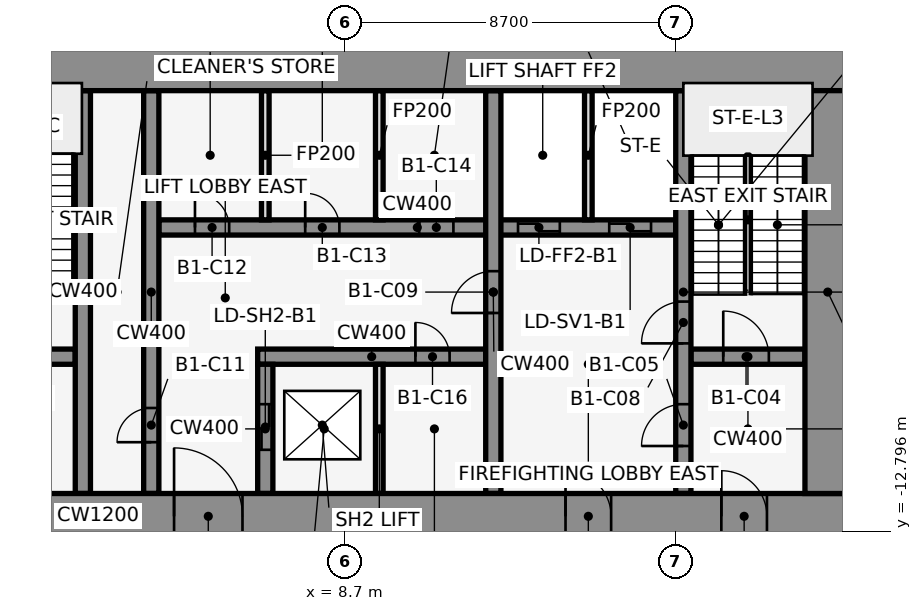
"""IFC4 building model, lengths in metres.
Left out: names, types, materials, properties, quantities, classifications, styles, units other than length and angle.
Written with IfcOpenShell. Run it as: python <this file> out.ifc"""

import sys

from ifc_helpers import new_model, si_unit, direction, frame, frame_2d, origin, place, context, subcontext, project, spatial, rectangle, extrude, element, fill, save


model = new_model("IFC4")
c1 = context("Model", 3, precision=1e-05, world=origin(), true_north=direction((0.0, 1.0)))
c2 = subcontext(c1, "Body", "Model", "MODEL_VIEW")
j1 = project(units=[si_unit("LENGTHUNIT", "METRE"), si_unit("PLANEANGLEUNIT", "RADIAN")], contexts=[c1])
p1 = place(None, origin())
s1 = spatial("IfcSite", under=j1, at=p1, CompositionType="ELEMENT")
p2 = place(p1, origin())
s2 = spatial("IfcBuilding", under=s1, at=p2, CompositionType="ELEMENT")
p3 = place(p2, frame((0.0, 0.0, -5.0)))
s3 = spatial("IfcBuildingStorey", under=s2, at=p3, CompositionType="ELEMENT", Elevation=-5.0)
p4 = place(p3, frame((-1.6, -8.2, 0.0), z_axis=(0.0, 0.0, 1.0), x_axis=(1.0, 0.0, 0.0)))
e1 = element("IfcWall", 1, at=p4, inside=s3, PredefinedType="SHEAR", context=c2, shape_type="SweptSolid", body=[
    extrude(rectangle(XDim=3.2, YDim=0.4, at=frame_2d((1.6, 0.0))), origin(), (0.0, 0.0, 1.0), 5.0),
])
p5 = place(p4, frame((1.05, 0.0, 0.0)))
e2 = element("IfcOpeningElement", 2, at=p5, cuts=e1, PredefinedType="OPENING", context=c2, shape_type="SweptSolid", body=[
    extrude(rectangle(XDim=1.2, YDim=2.1, at=frame_2d((0.6, 1.05))), frame((0.0, 0.212, 0.0), z_axis=(0.0, -1.0, 0.0), x_axis=(1.0, 0.0, 0.0)), (0.0, 0.0, 1.0), 0.424),
])
p6 = place(p3, frame((6.4, -8.2, 0.0), z_axis=(0.0, 0.0, 1.0), x_axis=(1.0, 0.0, 0.0)))
e3 = element("IfcWall", 3, at=p6, inside=s3, PredefinedType="SHEAR", context=c2, shape_type="SweptSolid", body=[
    extrude(rectangle(XDim=6.0, YDim=0.4, at=frame_2d((3.0, 0.0))), origin(), (0.0, 0.0, 1.0), 5.0),
])
p7 = place(p6, frame((4.15, 0.0, 0.0)))
e4 = element("IfcOpeningElement", 4, at=p7, cuts=e3, PredefinedType="OPENING", context=c2, shape_type="SweptSolid", body=[
    extrude(rectangle(XDim=0.9, YDim=2.1, at=frame_2d((0.45, 1.05))), frame((0.0, 0.212, 0.0), z_axis=(0.0, -1.0, 0.0), x_axis=(1.0, 0.0, 0.0)), (0.0, 0.0, 1.0), 0.424),
])
p8 = place(p3, frame((17.8, -8.2, 0.0), z_axis=(0.0, 0.0, 1.0), x_axis=(1.0, 0.0, 0.0)))
e5 = element("IfcWall", 5, at=p8, inside=s3, PredefinedType="SHEAR", context=c2, shape_type="SweptSolid", body=[
    extrude(rectangle(XDim=3.0, YDim=0.4, at=frame_2d((1.5, 0.0))), origin(), (0.0, 0.0, 1.0), 5.0),
])
p9 = place(p8, frame((0.85, 0.0, 0.0)))
e6 = element("IfcOpeningElement", 6, at=p9, cuts=e5, PredefinedType="OPENING", context=c2, shape_type="SweptSolid", body=[
    extrude(rectangle(XDim=1.2, YDim=2.1, at=frame_2d((0.6, 1.05))), frame((0.0, 0.212, 0.0), z_axis=(0.0, -1.0, 0.0), x_axis=(1.0, 0.0, 0.0)), (0.0, 0.0, 1.0), 0.424),
])
p10 = place(p3, frame((3.8, -4.8, 0.0), z_axis=(0.0, 0.0, 1.0), x_axis=(1.0, 0.0, 0.0)))
e7 = element("IfcWall", 7, at=p10, inside=s3, PredefinedType="SHEAR", context=c2, shape_type="SweptSolid", body=[
    extrude(rectangle(XDim=13.6, YDim=0.4, at=frame_2d((6.8, 0.0))), origin(), (0.0, 0.0, 1.0), 5.0),
])
p11 = place(p10, frame((9.45, 0.0, 0.0)))
e8 = element("IfcOpeningElement", 8, at=p11, cuts=e7, PredefinedType="OPENING", context=c2, shape_type="SweptSolid", body=[
    extrude(rectangle(XDim=1.1, YDim=2.1, at=frame_2d((0.55, 1.05))), frame((0.0, 0.212, 0.0), z_axis=(0.0, -1.0, 0.0), x_axis=(1.0, 0.0, 0.0)), (0.0, 0.0, 1.0), 0.424),
])
p12 = place(p10, frame((11.85, 0.0, 0.0)))
e9 = element("IfcOpeningElement", 9, at=p12, cuts=e7, PredefinedType="OPENING", context=c2, shape_type="SweptSolid", body=[
    extrude(rectangle(XDim=1.1, YDim=2.1, at=frame_2d((0.55, 1.05))), frame((0.0, 0.212, 0.0), z_axis=(0.0, -1.0, 0.0), x_axis=(1.0, 0.0, 0.0)), (0.0, 0.0, 1.0), 0.424),
])
p13 = place(p10, frame((0.95, 0.0, 0.0)))
e10 = element("IfcOpeningElement", 10, at=p13, cuts=e7, PredefinedType="OPENING", context=c2, shape_type="SweptSolid", body=[
    extrude(rectangle(XDim=0.9, YDim=2.1, at=frame_2d((0.45, 1.05))), frame((0.0, 0.212, 0.0), z_axis=(0.0, -1.0, 0.0), x_axis=(1.0, 0.0, 0.0)), (0.0, 0.0, 1.0), 0.424),
])
p14 = place(p10, frame((3.85, 0.0, 0.0)))
e11 = element("IfcOpeningElement", 11, at=p14, cuts=e7, PredefinedType="OPENING", context=c2, shape_type="SweptSolid", body=[
    extrude(rectangle(XDim=0.9, YDim=2.1, at=frame_2d((0.45, 1.05))), frame((0.0, 0.212, 0.0), z_axis=(0.0, -1.0, 0.0), x_axis=(1.0, 0.0, 0.0)), (0.0, 0.0, 1.0), 0.424),
])
p15 = place(p10, frame((6.85, 0.0, 0.0)))
e12 = element("IfcOpeningElement", 12, at=p15, cuts=e7, PredefinedType="OPENING", context=c2, shape_type="SweptSolid", body=[
    extrude(rectangle(XDim=0.9, YDim=2.1, at=frame_2d((0.45, 1.05))), frame((0.0, 0.212, 0.0), z_axis=(0.0, -1.0, 0.0), x_axis=(1.0, 0.0, 0.0)), (0.0, 0.0, 1.0), 0.424),
])
p16 = place(p3, frame((1.8, -11.8, 0.0), z_axis=(0.0, 0.0, 1.0), x_axis=(0.0, 1.0, 0.0)))
e13 = element("IfcWall", 13, at=p16, inside=s3, PredefinedType="SHEAR", context=c2, shape_type="SweptSolid", body=[
    extrude(rectangle(XDim=10.6, YDim=0.4, at=frame_2d((5.3, 0.0))), origin(), (0.0, 0.0, 1.0), 5.0),
])
p17 = place(p3, frame((3.6, -11.8, 0.0), z_axis=(0.0, 0.0, 1.0), x_axis=(0.0, 1.0, 0.0)))
e14 = element("IfcWall", 14, at=p17, inside=s3, PredefinedType="SHEAR", context=c2, shape_type="SweptSolid", body=[
    extrude(rectangle(XDim=10.6, YDim=0.4, at=frame_2d((5.3, 0.0))), origin(), (0.0, 0.0, 1.0), 5.0),
])
p18 = place(p17, frame((1.35, 0.0, 0.0)))
e15 = element("IfcOpeningElement", 15, at=p18, cuts=e14, PredefinedType="OPENING", context=c2, shape_type="SweptSolid", body=[
    extrude(rectangle(XDim=0.9, YDim=2.1, at=frame_2d((0.45, 1.05))), frame((0.0, 0.212, 0.0), z_axis=(0.0, -1.0, 0.0), x_axis=(1.0, 0.0, 0.0)), (0.0, 0.0, 1.0), 0.424),
])
p19 = place(p3, frame((6.6, -11.8, 0.0), z_axis=(0.0, 0.0, 1.0), x_axis=(0.0, 1.0, 0.0)))
e16 = element("IfcWall", 16, at=p19, inside=s3, PredefinedType="SHEAR", context=c2, shape_type="SweptSolid", body=[
    extrude(rectangle(XDim=3.4, YDim=0.4, at=frame_2d((1.7, 0.0))), origin(), (0.0, 0.0, 1.0), 5.0),
])
p20 = place(p19, frame((1.15, 0.0, 0.0)))
e17 = element("IfcOpeningElement", 17, at=p20, cuts=e16, PredefinedType="OPENING", context=c2, shape_type="SweptSolid", body=[
    extrude(rectangle(XDim=1.2, YDim=2.1, at=frame_2d((0.6, 1.05))), frame((0.0, 0.212, 0.0), z_axis=(0.0, -1.0, 0.0), x_axis=(1.0, 0.0, 0.0)), (0.0, 0.0, 1.0), 0.424),
])
for number, where, z_axis, x_axis in (
    (18, (6.6, -4.6, 0.0), (0.0, 0.0, 1.0), (0.0, 1.0, 0.0)),
    (19, (9.6, -11.8, 0.0), (0.0, 0.0, 1.0), (0.0, 1.0, 0.0)),
    (20, (9.6, -4.6, 0.0), (0.0, 0.0, 1.0), (0.0, 1.0, 0.0)),
):
    element("IfcWall", number, at=place(p3, frame(where, z_axis=z_axis, x_axis=x_axis)), inside=s3, PredefinedType="PARTITIONING", context=c2, shape_type="SweptSolid", body=[
        extrude(rectangle(XDim=3.4, YDim=0.2, at=frame_2d((1.7, 0.0))), origin(), (0.0, 0.0, 1.0), 4.7),
    ])
p21 = place(p3, frame((12.6, -11.8, 0.0), z_axis=(0.0, 0.0, 1.0), x_axis=(0.0, 1.0, 0.0)))
e21 = element("IfcWall", 21, at=p21, inside=s3, PredefinedType="SHEAR", context=c2, shape_type="SweptSolid", body=[
    extrude(rectangle(XDim=10.6, YDim=0.4, at=frame_2d((5.3, 0.0))), origin(), (0.0, 0.0, 1.0), 5.0),
])
p22 = place(p21, frame((4.75, 0.0, 0.0)))
e22 = element("IfcOpeningElement", 22, at=p22, cuts=e21, PredefinedType="OPENING", context=c2, shape_type="SweptSolid", body=[
    extrude(rectangle(XDim=1.1, YDim=2.1, at=frame_2d((0.55, 1.05))), frame((0.0, 0.212, 0.0), z_axis=(0.0, -1.0, 0.0), x_axis=(1.0, 0.0, 0.0)), (0.0, 0.0, 1.0), 0.424),
])
p23 = place(p3, frame((15.1, -4.6, 0.0), z_axis=(0.0, 0.0, 1.0), x_axis=(0.0, 1.0, 0.0)))
e23 = element("IfcWall", 23, at=p23, inside=s3, PredefinedType="PARTITIONING", context=c2, shape_type="SweptSolid", body=[
    extrude(rectangle(XDim=3.4, YDim=0.2, at=frame_2d((1.7, 0.0))), origin(), (0.0, 0.0, 1.0), 4.7),
])
p24 = place(p3, frame((17.6, -11.8, 0.0), z_axis=(0.0, 0.0, 1.0), x_axis=(0.0, 1.0, 0.0)))
e24 = element("IfcWall", 24, at=p24, inside=s3, PredefinedType="SHEAR", context=c2, shape_type="SweptSolid", body=[
    extrude(rectangle(XDim=10.6, YDim=0.4, at=frame_2d((5.3, 0.0))), origin(), (0.0, 0.0, 1.0), 5.0),
])
p25 = place(p24, frame((1.25, 0.0, 0.0)))
e25 = element("IfcOpeningElement", 25, at=p25, cuts=e24, PredefinedType="OPENING", context=c2, shape_type="SweptSolid", body=[
    extrude(rectangle(XDim=1.1, YDim=2.1, at=frame_2d((0.55, 1.05))), frame((0.0, 0.212, 0.0), z_axis=(0.0, -1.0, 0.0), x_axis=(1.0, 0.0, 0.0)), (0.0, 0.0, 1.0), 0.424),
])
p26 = place(p24, frame((3.95, 0.0, 0.0)))
e26 = element("IfcOpeningElement", 26, at=p26, cuts=e24, PredefinedType="OPENING", context=c2, shape_type="SweptSolid", body=[
    extrude(rectangle(XDim=1.1, YDim=2.1, at=frame_2d((0.55, 1.05))), frame((0.0, 0.212, 0.0), z_axis=(0.0, -1.0, 0.0), x_axis=(1.0, 0.0, 0.0)), (0.0, 0.0, 1.0), 0.424),
])
p27 = place(p3, frame((-22.0, -0.6, 0.0), z_axis=(0.0, 0.0, 1.0), x_axis=(1.0, 0.0, 0.0)))
e27 = element("IfcWall", 27, at=p27, inside=s3, PredefinedType="SHEAR", context=c2, shape_type="SweptSolid", body=[
    extrude(rectangle(XDim=44.0, YDim=1.2, at=frame_2d((22.0, 0.0))), origin(), (0.0, 0.0, 1.0), 5.0),
])
p28 = place(p3, frame((-22.0, -12.4, 0.0), z_axis=(0.0, 0.0, 1.0), x_axis=(1.0, 0.0, 0.0)))
e28 = element("IfcWall", 28, at=p28, inside=s3, PredefinedType="SHEAR", context=c2, shape_type="SweptSolid", body=[
    extrude(rectangle(XDim=44.0, YDim=1.2, at=frame_2d((22.0, 0.0))), origin(), (0.0, 0.0, 1.0), 5.0),
])
p29 = place(p28, frame((2.2, 0.0, 0.0)))
e29 = element("IfcOpeningElement", 29, at=p29, cuts=e28, PredefinedType="OPENING", context=c2, shape_type="SweptSolid", body=[
    extrude(rectangle(XDim=1.2, YDim=2.1, at=frame_2d((0.6, 1.05))), frame((0.0, 0.612, 0.0), z_axis=(0.0, -1.0, 0.0), x_axis=(1.0, 0.0, 0.0)), (0.0, 0.0, 1.0), 1.224),
])
p30 = place(p28, frame((21.4, 0.0, 0.0)))
e30 = element("IfcOpeningElement", 30, at=p30, cuts=e28, PredefinedType="OPENING", context=c2, shape_type="SweptSolid", body=[
    extrude(rectangle(XDim=1.2, YDim=2.1, at=frame_2d((0.6, 1.05))), frame((0.0, 0.612, 0.0), z_axis=(0.0, -1.0, 0.0), x_axis=(1.0, 0.0, 0.0)), (0.0, 0.0, 1.0), 1.224),
])
p31 = place(p28, frame((40.6, 0.0, 0.0)))
e31 = element("IfcOpeningElement", 31, at=p31, cuts=e28, PredefinedType="OPENING", context=c2, shape_type="SweptSolid", body=[
    extrude(rectangle(XDim=1.2, YDim=2.1, at=frame_2d((0.6, 1.05))), frame((0.0, 0.612, 0.0), z_axis=(0.0, -1.0, 0.0), x_axis=(1.0, 0.0, 0.0)), (0.0, 0.0, 1.0), 1.224),
])
p32 = place(p28, frame((16.0, 0.0, 0.0)))
e32 = element("IfcOpeningElement", 32, at=p32, cuts=e28, PredefinedType="OPENING", context=c2, shape_type="SweptSolid", body=[
    extrude(rectangle(XDim=1.8, YDim=2.1, at=frame_2d((0.9, 1.05))), frame((0.0, 0.612, 0.0), z_axis=(0.0, -1.0, 0.0), x_axis=(1.0, 0.0, 0.0)), (0.0, 0.0, 1.0), 1.224),
])
p33 = place(p28, frame((6.3, 0.0, 0.0)))
e33 = element("IfcOpeningElement", 33, at=p33, cuts=e28, PredefinedType="OPENING", context=c2, shape_type="SweptSolid", body=[
    extrude(rectangle(XDim=1.2, YDim=2.1, at=frame_2d((0.6, 1.05))), frame((0.0, 0.612, 0.0), z_axis=(0.0, -1.0, 0.0), x_axis=(1.0, 0.0, 0.0)), (0.0, 0.0, 1.0), 1.224),
])
p34 = place(p28, frame((26.2, 0.0, 0.0)))
e34 = element("IfcOpeningElement", 34, at=p34, cuts=e28, PredefinedType="OPENING", context=c2, shape_type="SweptSolid", body=[
    extrude(rectangle(XDim=1.8, YDim=2.1, at=frame_2d((0.9, 1.05))), frame((0.0, 0.612, 0.0), z_axis=(0.0, -1.0, 0.0), x_axis=(1.0, 0.0, 0.0)), (0.0, 0.0, 1.0), 1.224),
])
p35 = place(p28, frame((36.5, 0.0, 0.0)))
e35 = element("IfcOpeningElement", 35, at=p35, cuts=e28, PredefinedType="OPENING", context=c2, shape_type="SweptSolid", body=[
    extrude(rectangle(XDim=1.2, YDim=2.1, at=frame_2d((0.6, 1.05))), frame((0.0, 0.612, 0.0), z_axis=(0.0, -1.0, 0.0), x_axis=(1.0, 0.0, 0.0)), (0.0, 0.0, 1.0), 1.224),
])
p36 = place(p3, frame((21.4, -11.8, 0.0), z_axis=(0.0, 0.0, 1.0), x_axis=(0.0, 1.0, 0.0)))
e36 = element("IfcWall", 36, at=p36, inside=s3, PredefinedType="SHEAR", context=c2, shape_type="SweptSolid", body=[
    extrude(rectangle(XDim=10.6, YDim=1.2, at=frame_2d((5.3, 0.0))), origin(), (0.0, 0.0, 1.0), 5.0),
])
p37 = place(p9, origin())
e37 = element("IfcDoor", 37, at=p37, inside=s3, OperationType="SINGLE_SWING_RIGHT", PredefinedType="DOOR", context=c2, shape_type="SweptSolid", body=[
    extrude(rectangle(XDim=1.2, YDim=2.1, at=frame_2d((0.6, 1.05))), frame((0.0, 0.025, 0.0), z_axis=(0.0, -1.0, 0.0), x_axis=(1.0, 0.0, 0.0)), (0.0, 0.0, 1.0), 0.05),
])
fill(e6, e37)
p38 = place(p25, origin())
e38 = element("IfcDoor", 38, at=p38, inside=s3, OperationType="SINGLE_SWING_LEFT", PredefinedType="DOOR", context=c2, shape_type="SweptSolid", body=[
    extrude(rectangle(XDim=1.1, YDim=2.1, at=frame_2d((0.55, 1.05))), frame((0.0, 0.025, 0.0), z_axis=(0.0, -1.0, 0.0), x_axis=(1.0, 0.0, 0.0)), (0.0, 0.0, 1.0), 0.05),
])
fill(e25, e38)
p39 = place(p20, origin())
e39 = element("IfcDoor", 39, at=p39, inside=s3, OperationType="DOUBLE_DOOR_SLIDING", PredefinedType="DOOR", context=c2, shape_type="SweptSolid", body=[
    extrude(rectangle(XDim=1.2, YDim=2.1, at=frame_2d((0.6, 1.05))), frame((0.0, 0.025, 0.0), z_axis=(0.0, -1.0, 0.0), x_axis=(1.0, 0.0, 0.0)), (0.0, 0.0, 1.0), 0.05),
])
fill(e17, e39)
p40 = place(p11, origin())
e40 = element("IfcDoor", 40, at=p40, inside=s3, OperationType="DOUBLE_DOOR_SLIDING", PredefinedType="DOOR", context=c2, shape_type="SweptSolid", body=[
    extrude(rectangle(XDim=1.1, YDim=2.1, at=frame_2d((0.55, 1.05))), frame((0.0, 0.025, 0.0), z_axis=(0.0, -1.0, 0.0), x_axis=(1.0, 0.0, 0.0)), (0.0, 0.0, 1.0), 0.05),
])
fill(e8, e40)
p41 = place(p12, origin())
e41 = element("IfcDoor", 41, at=p41, inside=s3, OperationType="DOUBLE_DOOR_SLIDING", PredefinedType="DOOR", context=c2, shape_type="SweptSolid", body=[
    extrude(rectangle(XDim=1.1, YDim=2.1, at=frame_2d((0.55, 1.05))), frame((0.0, 0.025, 0.0), z_axis=(0.0, -1.0, 0.0), x_axis=(1.0, 0.0, 0.0)), (0.0, 0.0, 1.0), 0.05),
])
fill(e9, e41)
p42 = place(p26, origin())
e42 = element("IfcDoor", 42, at=p42, inside=s3, OperationType="SINGLE_SWING_RIGHT", PredefinedType="DOOR", context=c2, shape_type="SweptSolid", body=[
    extrude(rectangle(XDim=1.1, YDim=2.1, at=frame_2d((0.55, 1.05))), frame((0.0, 0.025, 0.0), z_axis=(0.0, -1.0, 0.0), x_axis=(1.0, 0.0, 0.0)), (0.0, 0.0, 1.0), 0.05),
])
fill(e26, e42)
p43 = place(p22, frame((1.1, 0.0, 0.0), z_axis=(0.0, 0.0, 1.0), x_axis=(-1.0, 0.0, 0.0)))
e43 = element("IfcDoor", 43, at=p43, inside=s3, OperationType="SINGLE_SWING_RIGHT", PredefinedType="DOOR", context=c2, shape_type="SweptSolid", body=[
    extrude(rectangle(XDim=1.1, YDim=2.1, at=frame_2d((0.55, 1.05))), frame((0.0, 0.025, 0.0), z_axis=(0.0, -1.0, 0.0), x_axis=(1.0, 0.0, 0.0)), (0.0, 0.0, 1.0), 0.05),
])
fill(e22, e43)
p44 = place(p18, origin())
e44 = element("IfcDoor", 44, at=p44, inside=s3, OperationType="SINGLE_SWING_LEFT", PredefinedType="DOOR", context=c2, shape_type="SweptSolid", body=[
    extrude(rectangle(XDim=0.9, YDim=2.1, at=frame_2d((0.45, 1.05))), frame((0.0, 0.025, 0.0), z_axis=(0.0, -1.0, 0.0), x_axis=(1.0, 0.0, 0.0)), (0.0, 0.0, 1.0), 0.05),
])
fill(e15, e44)
p45 = place(p13, origin())
e45 = element("IfcDoor", 45, at=p45, inside=s3, OperationType="SINGLE_SWING_RIGHT", PredefinedType="DOOR", context=c2, shape_type="SweptSolid", body=[
    extrude(rectangle(XDim=0.9, YDim=2.1, at=frame_2d((0.45, 1.05))), frame((0.0, 0.025, 0.0), z_axis=(0.0, -1.0, 0.0), x_axis=(1.0, 0.0, 0.0)), (0.0, 0.0, 1.0), 0.05),
])
fill(e10, e45)
p46 = place(p14, origin())
e46 = element("IfcDoor", 46, at=p46, inside=s3, OperationType="SINGLE_SWING_LEFT", PredefinedType="DOOR", context=c2, shape_type="SweptSolid", body=[
    extrude(rectangle(XDim=0.9, YDim=2.1, at=frame_2d((0.45, 1.05))), frame((0.0, 0.025, 0.0), z_axis=(0.0, -1.0, 0.0), x_axis=(1.0, 0.0, 0.0)), (0.0, 0.0, 1.0), 0.05),
])
fill(e11, e46)
p47 = place(p15, origin())
e47 = element("IfcDoor", 47, at=p47, inside=s3, OperationType="SINGLE_SWING_RIGHT", PredefinedType="DOOR", context=c2, shape_type="SweptSolid", body=[
    extrude(rectangle(XDim=0.9, YDim=2.1, at=frame_2d((0.45, 1.05))), frame((0.0, 0.025, 0.0), z_axis=(0.0, -1.0, 0.0), x_axis=(1.0, 0.0, 0.0)), (0.0, 0.0, 1.0), 0.05),
])
fill(e12, e47)
p48 = place(p7, frame((0.9, 0.0, 0.0), z_axis=(0.0, 0.0, 1.0), x_axis=(-1.0, 0.0, 0.0)))
e48 = element("IfcDoor", 48, at=p48, inside=s3, OperationType="SINGLE_SWING_LEFT", PredefinedType="DOOR", context=c2, shape_type="SweptSolid", body=[
    extrude(rectangle(XDim=0.9, YDim=2.1, at=frame_2d((0.45, 1.05))), frame((0.0, 0.025, 0.0), z_axis=(0.0, -1.0, 0.0), x_axis=(1.0, 0.0, 0.0)), (0.0, 0.0, 1.0), 0.05),
])
fill(e4, e48)
p49 = place(p31, frame((1.2, 0.0, 0.0), z_axis=(0.0, 0.0, 1.0), x_axis=(-1.0, 0.0, 0.0)))
e49 = element("IfcDoor", 49, at=p49, inside=s3, OperationType="SINGLE_SWING_RIGHT", PredefinedType="DOOR", context=c2, shape_type="SweptSolid", body=[
    extrude(rectangle(XDim=1.2, YDim=2.1, at=frame_2d((0.6, 1.05))), frame((0.0, 0.025, 0.0), z_axis=(0.0, -1.0, 0.0), x_axis=(1.0, 0.0, 0.0)), (0.0, 0.0, 1.0), 0.05),
])
fill(e31, e49)
p50 = place(p34, origin())
e50 = element("IfcDoor", 50, at=p50, inside=s3, OperationType="SINGLE_SWING_LEFT", PredefinedType="DOOR", context=c2, shape_type="SweptSolid", body=[
    extrude(rectangle(XDim=1.8, YDim=2.1, at=frame_2d((0.9, 1.05))), frame((0.0, 0.025, 0.0), z_axis=(0.0, -1.0, 0.0), x_axis=(1.0, 0.0, 0.0)), (0.0, 0.0, 1.0), 0.05),
])
fill(e34, e50)
p51 = place(p35, frame((1.2, 0.0, 0.0), z_axis=(0.0, 0.0, 1.0), x_axis=(-1.0, 0.0, 0.0)))
e51 = element("IfcDoor", 51, at=p51, inside=s3, OperationType="SINGLE_SWING_RIGHT", PredefinedType="DOOR", context=c2, shape_type="SweptSolid", body=[
    extrude(rectangle(XDim=1.2, YDim=2.1, at=frame_2d((0.6, 1.05))), frame((0.0, 0.025, 0.0), z_axis=(0.0, -1.0, 0.0), x_axis=(1.0, 0.0, 0.0)), (0.0, 0.0, 1.0), 0.05),
])
fill(e35, e51)
save(model, sys.argv[1])
